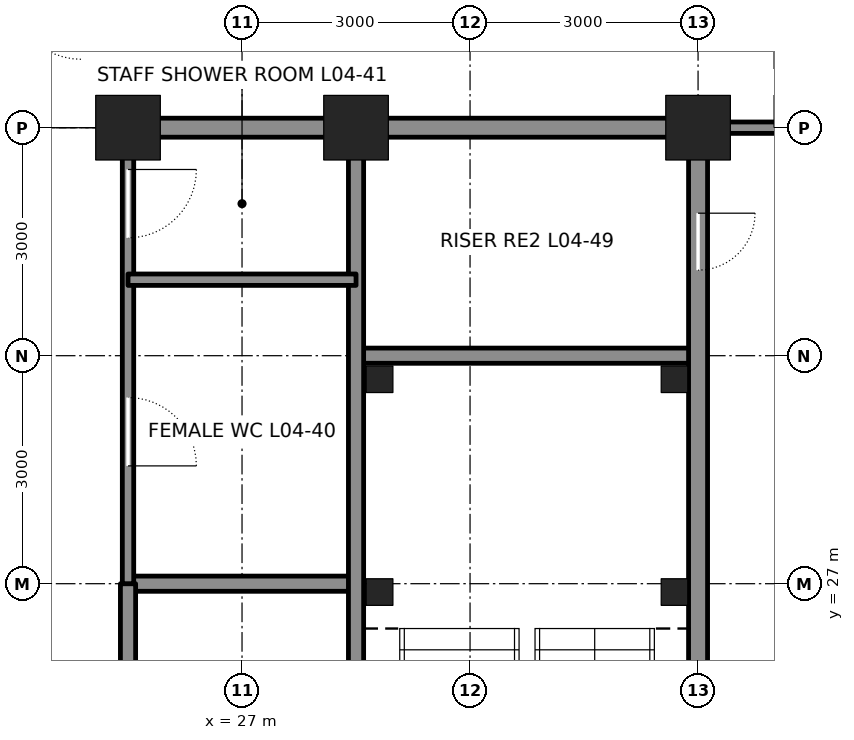
"""IFC4 building model, lengths in metres.
Left out: names, types, materials, properties, quantities, classifications, styles, units other than length and angle.
Written with IfcOpenShell. Run it as: python <this file> out.ifc"""

import sys

from ifc_helpers import new_model, si_unit, direction, frame, frame_2d, origin, origin_2d, place, context, subcontext, project, spatial, rectangle, hollow_rectangle, extrude, element, fill, save


model = new_model("IFC4")
c1 = context("Model", 3, precision=1e-05, world=origin(), true_north=direction((0.0, 1.0)))
c2 = subcontext(c1, "Body", "Model", "MODEL_VIEW")
j1 = project(units=[si_unit("LENGTHUNIT", "METRE"), si_unit("PLANEANGLEUNIT", "RADIAN")], contexts=[c1])
p1 = place(None, origin())
s1 = spatial("IfcSite", under=j1, at=p1, CompositionType="ELEMENT")
p2 = place(p1, origin())
s2 = spatial("IfcBuilding", under=s1, at=p2, CompositionType="ELEMENT")
p3 = place(p2, frame((0.0, 0.0, 24.3)))
s3 = spatial("IfcBuildingStorey", under=s2, at=p3, CompositionType="ELEMENT", Elevation=24.3)
for number, where, z_axis, x_axis in (
    (1, (25.5, 33.0, 0.0), (0.0, 0.0, 1.0), (1.0, 0.0, 0.0)),
    (2, (28.5, 33.0, 0.0), (0.0, 0.0, 1.0), (1.0, 0.0, 0.0)),
    (3, (33.0, 33.0, 0.0), (0.0, 0.0, 1.0), (1.0, 0.0, 0.0)),
):
    element("IfcColumn", number, at=place(p3, frame(where, z_axis=z_axis, x_axis=x_axis)), inside=s3, PredefinedType="COLUMN", context=c2, shape_type="SweptSolid", body=[
        extrude(hollow_rectangle(XDim=0.85, YDim=0.85, WallThickness=0.085, at=origin_2d()), origin(), (0.0, 0.0, 1.0), 4.5),
    ])
p4 = place(p3, frame((25.5, 27.0, 0.0), z_axis=(0.0, 0.0, 1.0), x_axis=(1.0, 0.0, 0.0)))
e4 = element("IfcWall", 4, at=p4, inside=s3, PredefinedType="SOLIDWALL", context=c2, shape_type="SweptSolid", body=[
    extrude(rectangle(XDim=3.0, YDim=0.2, at=frame_2d((1.5, 0.0))), origin(), (0.0, 0.0, 1.0), 4.34),
])
p5 = place(p3, frame((28.5, 30.0, 0.0), z_axis=(0.0, 0.0, 1.0), x_axis=(1.0, 0.0, 0.0)))
e5 = element("IfcWall", 5, at=p5, inside=s3, PredefinedType="SOLIDWALL", context=c2, shape_type="SweptSolid", body=[
    extrude(rectangle(XDim=4.5, YDim=0.2, at=frame_2d((2.25, 0.0))), origin(), (0.0, 0.0, 1.0), 4.34),
])
p6 = place(p3, frame((25.75, 33.0, 0.0), z_axis=(0.0, 0.0, 1.0), x_axis=(1.0, 0.0, 0.0)))
e6 = element("IfcWall", 6, at=p6, inside=s3, PredefinedType="SOLIDWALL", context=c2, shape_type="SweptSolid", body=[
    extrude(rectangle(XDim=2.5, YDim=0.25, at=frame_2d((1.25, 0.0))), origin(), (0.0, 0.0, 1.0), 3.181),
])
p7 = place(p3, frame((28.75, 33.0, 0.0), z_axis=(0.0, 0.0, 1.0), x_axis=(1.0, 0.0, 0.0)))
e7 = element("IfcWall", 7, at=p7, inside=s3, PredefinedType="SOLIDWALL", context=c2, shape_type="SweptSolid", body=[
    extrude(rectangle(XDim=4.0, YDim=0.25, at=frame_2d((2.0, 0.0))), origin(), (0.0, 0.0, 1.0), 3.181),
])
p8 = place(p3, frame((25.5, 15.0, 0.0), z_axis=(0.0, 0.0, 1.0), x_axis=(0.0, 1.0, 0.0)))
e8 = element("IfcWall", 8, at=p8, inside=s3, PredefinedType="SOLIDWALL", context=c2, shape_type="SweptSolid", body=[
    extrude(rectangle(XDim=12.0, YDim=0.2, at=frame_2d((6.0, 0.0))), origin(), (0.0, 0.0, 1.0), 3.365),
])
p9 = place(p3, frame((25.5, 27.0, 0.0), z_axis=(0.0, 0.0, 1.0), x_axis=(0.0, 1.0, 0.0)))
e9 = element("IfcWall", 9, at=p9, inside=s3, PredefinedType="PARTITIONING", context=c2, shape_type="SweptSolid", body=[
    extrude(rectangle(XDim=5.75, YDim=0.15, at=frame_2d((2.875, 0.0))), origin(), (0.0, 0.0, 1.0), 3.365),
])
p10 = place(p9, frame((1.55, 0.0, 0.0)))
e10 = element("IfcOpeningElement", 10, at=p10, cuts=e9, PredefinedType="OPENING", context=c2, shape_type="SweptSolid", body=[
    extrude(rectangle(XDim=0.9, YDim=2.1, at=frame_2d((0.45, 1.05))), frame((0.0, 0.085, 0.0), z_axis=(0.0, -1.0, 0.0), x_axis=(1.0, 0.0, 0.0)), (0.0, 0.0, 1.0), 0.17),
])
p11 = place(p9, frame((4.55, 0.0, 0.0)))
e11 = element("IfcOpeningElement", 11, at=p11, cuts=e9, PredefinedType="OPENING", context=c2, shape_type="SweptSolid", body=[
    extrude(rectangle(XDim=0.9, YDim=2.1, at=frame_2d((0.45, 1.05))), frame((0.0, 0.085, 0.0), z_axis=(0.0, -1.0, 0.0), x_axis=(1.0, 0.0, 0.0)), (0.0, 0.0, 1.0), 0.17),
])
p12 = place(p3, frame((28.5, 24.25, 0.0), z_axis=(0.0, 0.0, 1.0), x_axis=(0.0, 1.0, 0.0)))
e12 = element("IfcWall", 12, at=p12, inside=s3, PredefinedType="SOLIDWALL", context=c2, shape_type="SweptSolid", body=[
    extrude(rectangle(XDim=8.5, YDim=0.2, at=frame_2d((4.25, 0.0))), origin(), (0.0, 0.0, 1.0), 3.413),
])
p13 = place(p3, frame((33.0, 24.25, 0.0), z_axis=(0.0, 0.0, 1.0), x_axis=(0.0, 1.0, 0.0)))
e13 = element("IfcWall", 13, at=p13, inside=s3, PredefinedType="SOLIDWALL", context=c2, shape_type="SweptSolid", body=[
    extrude(rectangle(XDim=8.5, YDim=0.25, at=frame_2d((4.25, 0.0))), origin(), (0.0, 0.0, 1.0), 3.113),
])
p14 = place(p13, frame((6.875, 0.0, 0.0)))
e14 = element("IfcOpeningElement", 14, at=p14, cuts=e13, PredefinedType="OPENING", context=c2, shape_type="SweptSolid", body=[
    extrude(rectangle(XDim=0.75, YDim=2.1, at=frame_2d((0.375, 1.05))), frame((0.0, 0.135, 0.0), z_axis=(0.0, -1.0, 0.0), x_axis=(1.0, 0.0, 0.0)), (0.0, 0.0, 1.0), 0.27),
])
p15 = place(p3, frame((25.5, 31.0, 0.0), z_axis=(0.0, 0.0, 1.0), x_axis=(1.0, 0.0, 0.0)))
e15 = element("IfcWall", 15, at=p15, inside=s3, PredefinedType="PARTITIONING", context=c2, shape_type="SweptSolid", body=[
    extrude(rectangle(XDim=3.0, YDim=0.15, at=frame_2d((1.5, 0.0))), origin(), (0.0, 0.0, 1.0), 4.34),
])
p16 = place(p3, frame((33.0, 33.0, -0.3), z_axis=(0.0, 0.0, 1.0), x_axis=(1.0, 0.0, 0.0)))
e16 = element("IfcWall", 16, at=p16, inside=s3, PredefinedType="PARTITIONING", context=c2, shape_type="SweptSolid", body=[
    extrude(rectangle(XDim=3.0, YDim=0.15, at=frame_2d((1.5, 0.0))), origin(), (0.0, 0.0, 1.0), 3.481),
])
p17 = place(p16, frame((1.0, 0.0, 0.3)))
e17 = element("IfcOpeningElement", 17, at=p17, cuts=e16, PredefinedType="OPENING", context=c2, shape_type="SweptSolid", body=[
    extrude(rectangle(XDim=1.0, YDim=2.4, at=frame_2d((0.5, 1.2))), frame((0.0, 0.085, 0.0), z_axis=(0.0, -1.0, 0.0), x_axis=(1.0, 0.0, 0.0)), (0.0, 0.0, 1.0), 0.17),
])
for number, where, z_axis, x_axis in (
    (18, (28.81, 29.69, 0.0), (0.0, 0.0, 1.0), (1.0, 0.0, 0.0)),
    (19, (32.69, 29.69, 0.0), (0.0, 0.0, 1.0), (1.0, 0.0, 0.0)),
    (20, (28.81, 26.89, 0.0), (0.0, 0.0, 1.0), (1.0, 0.0, 0.0)),
    (21, (32.69, 26.89, 0.0), (0.0, 0.0, 1.0), (1.0, 0.0, 0.0)),
):
    element("IfcColumn", number, at=place(p3, frame(where, z_axis=z_axis, x_axis=x_axis)), inside=s3, PredefinedType="COLUMN", context=c2, shape_type="SweptSolid", body=[
        extrude(hollow_rectangle(XDim=0.35, YDim=0.35, WallThickness=0.035, at=origin_2d()), origin(), (0.0, 0.0, 1.0), 4.5),
    ])
p18 = place(p14, frame((0.75, 0.0, 0.0), z_axis=(0.0, 0.0, 1.0), x_axis=(-1.0, 0.0, 0.0)))
e22 = element("IfcDoor", 22, at=p18, inside=s3, OperationType="SINGLE_SWING_LEFT", PredefinedType="DOOR", context=c2, shape_type="SweptSolid", body=[
    extrude(rectangle(XDim=0.75, YDim=2.1, at=frame_2d((0.375, 1.05))), frame((0.0, 0.025, 0.0), z_axis=(0.0, -1.0, 0.0), x_axis=(1.0, 0.0, 0.0)), (0.0, 0.0, 1.0), 0.05),
])
fill(e14, e22)
p19 = place(p10, frame((0.9, 0.0, 0.0), z_axis=(0.0, 0.0, 1.0), x_axis=(-1.0, 0.0, 0.0)))
e23 = element("IfcDoor", 23, at=p19, inside=s3, OperationType="SINGLE_SWING_RIGHT", PredefinedType="DOOR", context=c2, shape_type="SweptSolid", body=[
    extrude(rectangle(XDim=0.9, YDim=2.1, at=frame_2d((0.45, 1.05))), frame((0.0, 0.025, 0.0), z_axis=(0.0, -1.0, 0.0), x_axis=(1.0, 0.0, 0.0)), (0.0, 0.0, 1.0), 0.05),
])
fill(e10, e23)
p20 = place(p11, frame((0.9, 0.0, 0.0), z_axis=(0.0, 0.0, 1.0), x_axis=(-1.0, 0.0, 0.0)))
e24 = element("IfcDoor", 24, at=p20, inside=s3, OperationType="SINGLE_SWING_LEFT", PredefinedType="DOOR", context=c2, shape_type="SweptSolid", body=[
    extrude(rectangle(XDim=0.9, YDim=2.1, at=frame_2d((0.45, 1.05))), frame((0.0, 0.025, 0.0), z_axis=(0.0, -1.0, 0.0), x_axis=(1.0, 0.0, 0.0)), (0.0, 0.0, 1.0), 0.05),
])
fill(e11, e24)
save(model, sys.argv[1])
